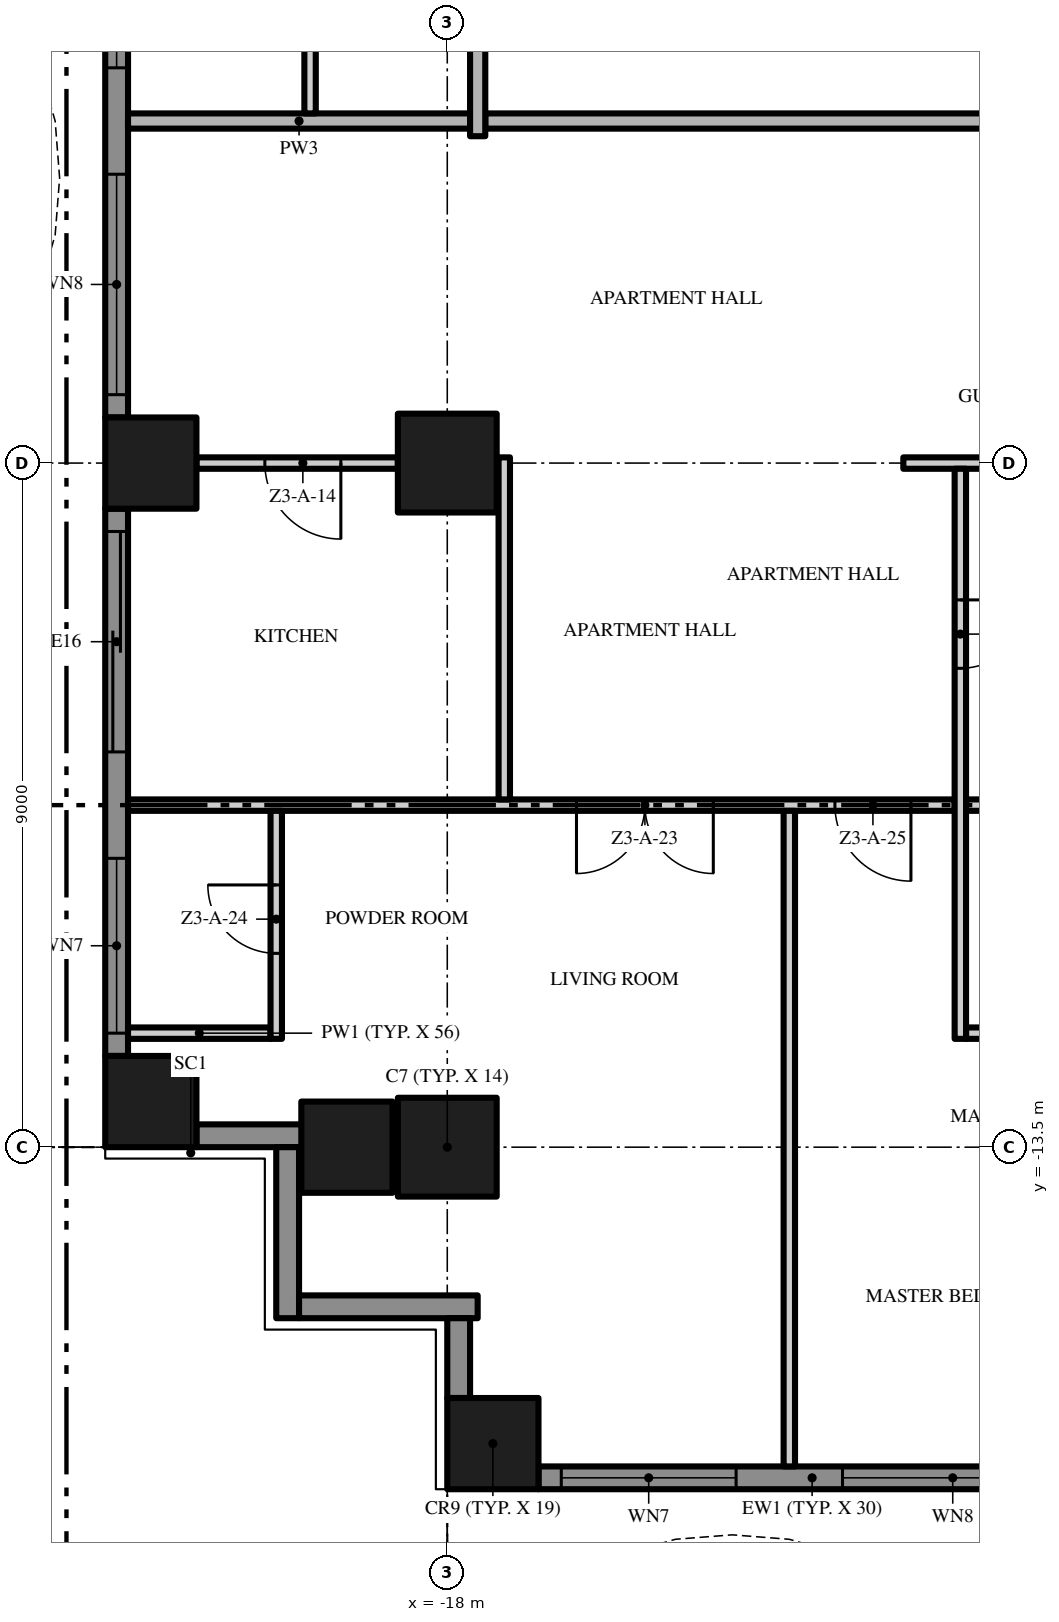
"""IFC4 building model, lengths in metres.
Left out: names, types, materials, properties, quantities, classifications, styles, units other than length and angle.
Written with IfcOpenShell. Run it as: python <this file> out.ifc"""

import sys

from ifc_helpers import new_model, si_unit, direction, frame, frame_2d, origin, origin_2d, place, context, subcontext, project, spatial, polyline, rectangle, outline, extrude, element, fill, save


model = new_model("IFC4")
c1 = context("Model", 3, precision=1e-05, world=origin(), true_north=direction((0.0, 1.0)))
c2 = subcontext(c1, "Body", "Model", "MODEL_VIEW")
j1 = project(units=[si_unit("LENGTHUNIT", "METRE"), si_unit("PLANEANGLEUNIT", "RADIAN")], contexts=[c1])
p1 = place(None, origin())
s1 = spatial("IfcSite", under=j1, at=p1, CompositionType="ELEMENT")
p2 = place(p1, origin())
s2 = spatial("IfcBuilding", under=s1, at=p2, CompositionType="ELEMENT")
p3 = place(p2, frame((0.0, 0.0, 128.8)))
s3 = spatial("IfcBuildingStorey", under=s2, at=p3, CompositionType="ELEMENT", Elevation=128.8)
p4 = place(p3, frame((-18.0, -13.5, 0.0), z_axis=(0.0, 0.0, 1.0), x_axis=(1.0, 0.0, 0.0)))
e1 = element("IfcColumn", 1, at=p4, inside=s3, PredefinedType="COLUMN", context=c2, shape_type="SweptSolid", body=[
    extrude(rectangle(XDim=1.3, YDim=1.3, at=origin_2d()), origin(), (0.0, 0.0, 1.0), 3.5),
])
p5 = place(p3, frame((-17.4, -17.4, 0.0), z_axis=(0.0, 0.0, 1.0), x_axis=(1.0, 0.0, 0.0)))
e2 = element("IfcColumn", 2, at=p5, inside=s3, PredefinedType="COLUMN", context=c2, shape_type="SweptSolid", body=[
    extrude(rectangle(XDim=1.2, YDim=1.2, at=origin_2d()), origin(), (0.0, 0.0, 1.0), 3.5),
])
p6 = place(p3, frame((-18.0, -4.5, 0.0), z_axis=(0.0, 0.0, 1.0), x_axis=(1.0, 0.0, 0.0)))
e3 = element("IfcColumn", 3, at=p6, inside=s3, PredefinedType="COLUMN", context=c2, shape_type="SweptSolid", body=[
    extrude(rectangle(XDim=1.3, YDim=1.3, at=origin_2d()), origin(), (0.0, 0.0, 1.0), 3.5),
])
for number, where, z_axis, x_axis in (
    (4, (-21.9, -12.9, 0.0), (0.0, 0.0, 1.0), (1.0, 0.0, 0.0)),
    (5, (-19.32, -13.5, 0.0), (0.0, 0.0, 1.0), (1.0, 0.0, 0.0)),
    (6, (-21.9, -4.5, 0.0), (0.0, 0.0, 1.0), (1.0, 0.0, 0.0)),
):
    element("IfcColumn", number, at=place(p3, frame(where, z_axis=z_axis, x_axis=x_axis)), inside=s3, PredefinedType="COLUMN", context=c2, shape_type="SweptSolid", body=[
        extrude(rectangle(XDim=1.2, YDim=1.2, at=origin_2d()), origin(), (0.0, 0.0, 1.0), 3.5),
    ])
p7 = place(p3, frame((-9.6, -17.85, 0.0), z_axis=(0.0, 0.0, 1.0), x_axis=(-1.0, 0.0, 0.0)))
e7 = element("IfcWall", 7, at=p7, inside=s3, PredefinedType="SOLIDWALL", context=c2, shape_type="SweptSolid", body=[
    extrude(rectangle(XDim=7.2, YDim=0.3, at=frame_2d((3.6, 0.0))), origin(), (0.0, 0.0, 1.0), 3.5),
])
p8 = place(p7, frame((4.6, 0.0, 0.45)))
e8 = element("IfcOpeningElement", 8, at=p8, cuts=e7, PredefinedType="OPENING", context=c2, shape_type="SweptSolid", body=[
    extrude(rectangle(XDim=2.3, YDim=2.65, at=frame_2d((1.15, 1.325))), frame((0.0, 0.16, 0.0), z_axis=(0.0, -1.0, 0.0), x_axis=(1.0, 0.0, 0.0)), (0.0, 0.0, 1.0), 0.32),
])
p9 = place(p7, frame((0.3, 0.0, 0.45)))
e9 = element("IfcOpeningElement", 9, at=p9, cuts=e7, PredefinedType="OPENING", context=c2, shape_type="SweptSolid", body=[
    extrude(rectangle(XDim=2.9, YDim=2.65, at=frame_2d((1.45, 1.325))), frame((0.0, 0.16, 0.0), z_axis=(0.0, -1.0, 0.0), x_axis=(1.0, 0.0, 0.0)), (0.0, 0.0, 1.0), 0.32),
])
p10 = place(p3, frame((-22.35, -3.9, 0.0), z_axis=(0.0, 0.0, 1.0), x_axis=(0.0, 1.0, 0.0)))
e10 = element("IfcWall", 10, at=p10, inside=s3, PredefinedType="SOLIDWALL", context=c2, shape_type="SweptSolid", body=[
    extrude(rectangle(XDim=7.8, YDim=0.3, at=frame_2d((3.9, 0.0))), origin(), (0.0, 0.0, 1.0), 3.5),
])
p11 = place(p10, frame((4.6, 0.0, 0.45)))
e11 = element("IfcOpeningElement", 11, at=p11, cuts=e10, PredefinedType="OPENING", context=c2, shape_type="SweptSolid", body=[
    extrude(rectangle(XDim=2.9, YDim=2.65, at=frame_2d((1.45, 1.325))), frame((0.0, 0.16, 0.0), z_axis=(0.0, -1.0, 0.0), x_axis=(1.0, 0.0, 0.0)), (0.0, 0.0, 1.0), 0.32),
])
p12 = place(p10, frame((0.3, 0.0, 0.45)))
e12 = element("IfcOpeningElement", 12, at=p12, cuts=e10, PredefinedType="OPENING", context=c2, shape_type="SweptSolid", body=[
    extrude(rectangle(XDim=2.9, YDim=2.65, at=frame_2d((1.45, 1.325))), frame((0.0, 0.16, 0.0), z_axis=(0.0, -1.0, 0.0), x_axis=(1.0, 0.0, 0.0)), (0.0, 0.0, 1.0), 0.32),
])
p13 = place(p3, frame((-22.35, -12.3, 0.0), z_axis=(0.0, 0.0, 1.0), x_axis=(0.0, 1.0, 0.0)))
e13 = element("IfcWall", 13, at=p13, inside=s3, PredefinedType="SOLIDWALL", context=c2, shape_type="SweptSolid", body=[
    extrude(rectangle(XDim=7.2, YDim=0.3, at=frame_2d((3.6, 0.0))), origin(), (0.0, 0.0, 1.0), 3.5),
])
p14 = place(p13, frame((4.0, 0.0, 0.0)))
e14 = element("IfcOpeningElement", 14, at=p14, cuts=e13, PredefinedType="OPENING", context=c2, shape_type="SweptSolid", body=[
    extrude(rectangle(XDim=2.9, YDim=2.4, at=frame_2d((1.45, 1.2))), frame((0.0, 0.16, 0.0), z_axis=(0.0, -1.0, 0.0), x_axis=(1.0, 0.0, 0.0)), (0.0, 0.0, 1.0), 0.32),
])
p15 = place(p13, frame((0.3, 0.0, 0.45)))
e15 = element("IfcOpeningElement", 15, at=p15, cuts=e13, PredefinedType="OPENING", context=c2, shape_type="SweptSolid", body=[
    extrude(rectangle(XDim=2.3, YDim=2.65, at=frame_2d((1.15, 1.325))), frame((0.0, 0.16, 0.0), z_axis=(0.0, -1.0, 0.0), x_axis=(1.0, 0.0, 0.0)), (0.0, 0.0, 1.0), 0.32),
])
p16 = place(p3, frame((-19.85, -13.35, 0.0), z_axis=(0.0, 0.0, 1.0), x_axis=(-1.0, 0.0, 0.0)))
e16 = element("IfcWall", 16, at=p16, inside=s3, PredefinedType="SOLIDWALL", context=c2, shape_type="SweptSolid", body=[
    extrude(rectangle(XDim=1.45, YDim=0.3, at=frame_2d((0.725, 0.0))), origin(), (0.0, 0.0, 1.0), 3.5),
])
p17 = place(p3, frame((-20.1, -15.75, 0.0), z_axis=(0.0, 0.0, 1.0), x_axis=(0.0, 1.0, 0.0)))
e17 = element("IfcWall", 17, at=p17, inside=s3, PredefinedType="SOLIDWALL", context=c2, shape_type="SweptSolid", body=[
    extrude(rectangle(XDim=2.25, YDim=0.3, at=frame_2d((1.125, 0.0))), origin(), (0.0, 0.0, 1.0), 3.5),
])
p18 = place(p3, frame((-17.6, -15.6, 0.0), z_axis=(0.0, 0.0, 1.0), x_axis=(-1.0, 0.0, 0.0)))
e18 = element("IfcWall", 18, at=p18, inside=s3, PredefinedType="SOLIDWALL", context=c2, shape_type="SweptSolid", body=[
    extrude(rectangle(XDim=2.35, YDim=0.3, at=frame_2d((1.175, 0.0))), origin(), (0.0, 0.0, 1.0), 3.5),
])
p19 = place(p3, frame((-17.85, -16.8, 0.0), z_axis=(0.0, 0.0, 1.0), x_axis=(0.0, 1.0, 0.0)))
e19 = element("IfcWall", 19, at=p19, inside=s3, PredefinedType="SOLIDWALL", context=c2, shape_type="SweptSolid", body=[
    extrude(rectangle(XDim=1.05, YDim=0.3, at=frame_2d((0.525, 0.0))), origin(), (0.0, 0.0, 1.0), 3.5),
])
p20 = place(p3, origin())
e20 = element("IfcWall", 20, at=p20, inside=s3, PredefinedType="USERDEFINED", context=c2, shape_type="SweptSolid", body=[
    extrude(outline(polyline([(-18.0, -19.8), (-16.5, -19.095), (-15.0, -18.659), (-14.25, -18.6), (-13.5, -18.659), (-12.0, -19.095), (-10.5, -19.8), (-9.0, -20.505), (-7.5, -20.941), (-6.75, -21.0), (-6.0, -20.941), (-4.5, -20.505), (-3.0, -19.8), (-1.5, -19.095), (0.0, -18.659), (0.75, -18.6), (1.5, -18.659), (3.0, -19.095), (4.5, -19.8), (6.0, -20.505), (7.5, -20.941), (8.25, -21.0), (9.0, -20.941), (10.5, -20.505), (12.0, -19.8), (13.5, -19.095), (15.0, -18.659), (15.75, -18.6), (16.5, -18.659), (18.0, -19.095), (18.07, -18.855), (16.545, -18.411), (15.75, -18.349), (14.955, -18.411), (13.411, -18.86), (11.894, -19.574), (10.411, -20.271), (8.955, -20.694), (8.25, -20.749), (7.545, -20.694), (6.089, -20.271), (4.606, -19.574), (3.089, -18.86), (1.545, -18.411), (0.75, -18.349), (-0.045, -18.411), (-1.589, -18.86), (-3.106, -19.574), (-4.589, -20.271), (-6.045, -20.694), (-6.75, -20.749), (-7.455, -20.694), (-8.911, -20.271), (-10.394, -19.574), (-11.911, -18.86), (-13.455, -18.411), (-14.25, -18.349), (-15.045, -18.411), (-16.589, -18.86), (-18.106, -19.574), (-18.0, -19.8)])), origin(), (0.0, 0.0, 1.0), 0.9),
])
p21 = place(p3, origin())
e21 = element("IfcWall", 21, at=p21, inside=s3, PredefinedType="USERDEFINED", context=c2, shape_type="SweptSolid", body=[
    extrude(outline(polyline([(-24.3, 18.0), (-23.595, 16.5), (-23.159, 15.0), (-23.1, 14.25), (-23.159, 13.5), (-23.595, 12.0), (-24.3, 10.5), (-25.005, 9.0), (-25.441, 7.5), (-25.5, 6.75), (-25.441, 6.0), (-25.005, 4.5), (-24.3, 3.0), (-23.595, 1.5), (-23.159, 0.0), (-23.1, -0.75), (-23.159, -1.5), (-23.595, -3.0), (-24.3, -4.5), (-25.005, -6.0), (-25.441, -7.5), (-25.5, -8.25), (-25.441, -9.0), (-25.005, -10.5), (-24.3, -12.0), (-23.595, -13.5), (-23.368, -13.394), (-24.074, -11.894), (-24.771, -10.411), (-25.194, -8.955), (-25.249, -8.25), (-25.194, -7.545), (-24.771, -6.089), (-24.074, -4.606), (-23.36, -3.089), (-22.911, -1.545), (-22.849, -0.75), (-22.911, 0.045), (-23.36, 1.589), (-24.074, 3.106), (-24.771, 4.589), (-25.194, 6.045), (-25.249, 6.75), (-25.194, 7.455), (-24.771, 8.911), (-24.074, 10.394), (-23.36, 11.911), (-22.911, 13.455), (-22.849, 14.25), (-22.911, 15.045), (-23.36, 16.589), (-24.074, 18.106), (-24.3, 18.0)])), origin(), (0.0, 0.0, 1.0), 0.9),
])
p22 = place(p3, frame((-22.2, -12.0, 0.0), z_axis=(0.0, 0.0, 1.0), x_axis=(1.0, 0.0, 0.0)))
e22 = element("IfcWall", 22, at=p22, inside=s3, PredefinedType="PARTITIONING", context=c2, shape_type="SweptSolid", body=[
    extrude(rectangle(XDim=1.875, YDim=0.15, at=frame_2d((0.938, 0.0))), origin(), (0.0, 0.0, 1.0), 3.5),
])
p23 = place(p3, frame((-11.175, -12.0, 0.0), z_axis=(0.0, 0.0, 1.0), x_axis=(1.0, 0.0, 0.0)))
e23 = element("IfcWall", 23, at=p23, inside=s3, PredefinedType="PARTITIONING", context=c2, shape_type="SweptSolid", body=[
    extrude(rectangle(XDim=2.1, YDim=0.15, at=frame_2d((1.05, 0.0))), origin(), (0.0, 0.0, 1.0), 3.5),
])
p24 = place(p23, frame((0.6, 0.0, 0.0)))
e24 = element("IfcOpeningElement", 24, at=p24, cuts=e23, PredefinedType="OPENING", context=c2, shape_type="SweptSolid", body=[
    extrude(rectangle(XDim=0.9, YDim=2.1, at=frame_2d((0.45, 1.05))), frame((0.0, 0.085, 0.0), z_axis=(0.0, -1.0, 0.0), x_axis=(1.0, 0.0, 0.0)), (0.0, 0.0, 1.0), 0.17),
])
p25 = place(p3, frame((-11.325, -9.0, 0.0), z_axis=(0.0, 0.0, 1.0), x_axis=(-1.0, 0.0, 0.0)))
e25 = element("IfcWall", 25, at=p25, inside=s3, PredefinedType="PARTITIONING", context=c2, shape_type="SweptSolid", body=[
    extrude(rectangle(XDim=10.875, YDim=0.15, at=frame_2d((5.438, 0.0))), origin(), (0.0, 0.0, 1.0), 3.5),
])
p26 = place(p25, frame((3.175, 0.0, 0.0)))
e26 = element("IfcOpeningElement", 26, at=p26, cuts=e25, PredefinedType="OPENING", context=c2, shape_type="SweptSolid", body=[
    extrude(rectangle(XDim=1.8, YDim=2.4, at=frame_2d((0.9, 1.2))), frame((0.0, 0.085, 0.0), z_axis=(0.0, -1.0, 0.0), x_axis=(1.0, 0.0, 0.0)), (0.0, 0.0, 1.0), 0.17),
])
p27 = place(p25, frame((0.575, 0.0, 0.0)))
e27 = element("IfcOpeningElement", 27, at=p27, cuts=e25, PredefinedType="OPENING", context=c2, shape_type="SweptSolid", body=[
    extrude(rectangle(XDim=1.0, YDim=2.4, at=frame_2d((0.5, 1.2))), frame((0.0, 0.085, 0.0), z_axis=(0.0, -1.0, 0.0), x_axis=(1.0, 0.0, 0.0)), (0.0, 0.0, 1.0), 0.17),
])
p28 = place(p3, frame((-11.175, -9.0, 0.0), z_axis=(0.0, 0.0, 1.0), x_axis=(1.0, 0.0, 0.0)))
e28 = element("IfcWall", 28, at=p28, inside=s3, PredefinedType="PARTITIONING", context=c2, shape_type="SweptSolid", body=[
    extrude(rectangle(XDim=2.1, YDim=0.15, at=frame_2d((1.05, 0.0))), origin(), (0.0, 0.0, 1.0), 3.5),
])
p29 = place(p3, frame((-18.65, -4.5, 0.0), z_axis=(0.0, 0.0, 1.0), x_axis=(-1.0, 0.0, 0.0)))
e29 = element("IfcWall", 29, at=p29, inside=s3, PredefinedType="PARTITIONING", context=c2, shape_type="SweptSolid", body=[
    extrude(rectangle(XDim=2.65, YDim=0.15, at=frame_2d((1.325, 0.0))), origin(), (0.0, 0.0, 1.0), 3.5),
])
p30 = place(p29, frame((0.75, 0.0, 0.0)))
e30 = element("IfcOpeningElement", 30, at=p30, cuts=e29, PredefinedType="OPENING", context=c2, shape_type="SweptSolid", body=[
    extrude(rectangle(XDim=1.0, YDim=2.4, at=frame_2d((0.5, 1.2))), frame((0.0, 0.085, 0.0), z_axis=(0.0, -1.0, 0.0), x_axis=(1.0, 0.0, 0.0)), (0.0, 0.0, 1.0), 0.17),
])
p31 = place(p3, frame((-12.0, -4.5, 0.0), z_axis=(0.0, 0.0, 1.0), x_axis=(1.0, 0.0, 0.0)))
e31 = element("IfcWall", 31, at=p31, inside=s3, PredefinedType="PARTITIONING", context=c2, shape_type="SweptSolid", body=[
    extrude(rectangle(XDim=2.35, YDim=0.15, at=frame_2d((1.175, 0.0))), origin(), (0.0, 0.0, 1.0), 3.5),
])
p32 = place(p3, frame((17.5, 0.0, 0.0), z_axis=(0.0, 0.0, 1.0), x_axis=(-1.0, 0.0, 0.0)))
e32 = element("IfcWall", 32, at=p32, inside=s3, PredefinedType="PARTITIONING", context=c2, shape_type="SweptSolid", body=[
    extrude(rectangle(XDim=35.0, YDim=0.2, at=frame_2d((17.5, 0.0))), origin(), (0.0, 0.0, 1.0), 3.5),
])
p33 = place(p32, frame((16.75, 0.0, 0.0)))
e33 = element("IfcOpeningElement", 33, at=p33, cuts=e32, PredefinedType="OPENING", context=c2, shape_type="SweptSolid", body=[
    extrude(rectangle(XDim=1.5, YDim=2.4, at=frame_2d((0.75, 1.2))), frame((0.0, 0.11, 0.0), z_axis=(0.0, -1.0, 0.0), x_axis=(1.0, 0.0, 0.0)), (0.0, 0.0, 1.0), 0.22),
])
p34 = place(p3, frame((-22.2, 0.0, 0.0), z_axis=(0.0, 0.0, 1.0), x_axis=(1.0, 0.0, 0.0)))
e34 = element("IfcWall", 34, at=p34, inside=s3, PredefinedType="PARTITIONING", context=c2, shape_type="SweptSolid", body=[
    extrude(rectangle(XDim=4.5, YDim=0.2, at=frame_2d((2.25, 0.0))), origin(), (0.0, 0.0, 1.0), 3.5),
])
p35 = place(p3, frame((-20.25, -12.075, 0.0), z_axis=(0.0, 0.0, 1.0), x_axis=(0.0, 1.0, 0.0)))
e35 = element("IfcWall", 35, at=p35, inside=s3, PredefinedType="PARTITIONING", context=c2, shape_type="SweptSolid", body=[
    extrude(rectangle(XDim=3.0, YDim=0.15, at=frame_2d((1.5, 0.0))), origin(), (0.0, 0.0, 1.0), 3.5),
])
p36 = place(p35, frame((1.125, 0.0, 0.0)))
e36 = element("IfcOpeningElement", 36, at=p36, cuts=e35, PredefinedType="OPENING", context=c2, shape_type="SweptSolid", body=[
    extrude(rectangle(XDim=0.9, YDim=2.1, at=frame_2d((0.45, 1.05))), frame((0.0, 0.085, 0.0), z_axis=(0.0, -1.0, 0.0), x_axis=(1.0, 0.0, 0.0)), (0.0, 0.0, 1.0), 0.17),
])
p37 = place(p3, frame((-19.805, 0.1, 0.0), z_axis=(0.0, 0.0, 1.0), x_axis=(0.0, 1.0, 0.0)))
e37 = element("IfcWall", 37, at=p37, inside=s3, PredefinedType="PARTITIONING", context=c2, shape_type="SweptSolid", body=[
    extrude(rectangle(XDim=2.225, YDim=0.15, at=frame_2d((1.113, 0.0))), origin(), (0.0, 0.0, 1.0), 3.5),
])
p38 = place(p3, frame((-17.6, -0.2, 0.0), z_axis=(0.0, 0.0, 1.0), x_axis=(0.0, 1.0, 0.0)))
e38 = element("IfcWall", 38, at=p38, inside=s3, PredefinedType="PARTITIONING", context=c2, shape_type="SweptSolid", body=[
    extrude(rectangle(XDim=4.05, YDim=0.2, at=frame_2d((2.025, 0.0))), origin(), (0.0, 0.0, 1.0), 3.5),
])
p39 = place(p3, frame((-17.25, -8.925, 0.0), z_axis=(0.0, 0.0, 1.0), x_axis=(0.0, 1.0, 0.0)))
e39 = element("IfcWall", 39, at=p39, inside=s3, PredefinedType="PARTITIONING", context=c2, shape_type="SweptSolid", body=[
    extrude(rectangle(XDim=4.5, YDim=0.15, at=frame_2d((2.25, 0.0))), origin(), (0.0, 0.0, 1.0), 3.5),
])
p40 = place(p3, frame((-13.5, -17.7, 0.0), z_axis=(0.0, 0.0, 1.0), x_axis=(0.0, 1.0, 0.0)))
e40 = element("IfcWall", 40, at=p40, inside=s3, PredefinedType="PARTITIONING", context=c2, shape_type="SweptSolid", body=[
    extrude(rectangle(XDim=8.625, YDim=0.15, at=frame_2d((4.312, 0.0))), origin(), (0.0, 0.0, 1.0), 3.5),
])
p41 = place(p3, frame((-11.25, -4.575, 0.0), z_axis=(0.0, 0.0, 1.0), x_axis=(0.0, -1.0, 0.0)))
e41 = element("IfcWall", 41, at=p41, inside=s3, PredefinedType="PARTITIONING", context=c2, shape_type="SweptSolid", body=[
    extrude(rectangle(XDim=7.5, YDim=0.15, at=frame_2d((3.75, 0.0))), origin(), (0.0, 0.0, 1.0), 3.5),
])
p42 = place(p41, frame((1.725, 0.0, 0.0)))
e42 = element("IfcOpeningElement", 42, at=p42, cuts=e41, PredefinedType="OPENING", context=c2, shape_type="SweptSolid", body=[
    extrude(rectangle(XDim=0.9, YDim=2.1, at=frame_2d((0.45, 1.05))), frame((0.0, 0.085, 0.0), z_axis=(0.0, -1.0, 0.0), x_axis=(1.0, 0.0, 0.0)), (0.0, 0.0, 1.0), 0.17),
])
p43 = place(p8, origin())
e43 = element("IfcWindow", 43, at=p43, inside=s3, PartitioningType="SINGLE_PANEL", PredefinedType="WINDOW", context=c2, shape_type="SweptSolid", body=[
    extrude(rectangle(XDim=2.3, YDim=2.65, at=frame_2d((1.15, 1.325))), frame((0.0, 0.03, 0.0), z_axis=(0.0, -1.0, 0.0), x_axis=(1.0, 0.0, 0.0)), (0.0, 0.0, 1.0), 0.06),
])
fill(e8, e43)
p44 = place(p9, origin())
e44 = element("IfcWindow", 44, at=p44, inside=s3, PartitioningType="SINGLE_PANEL", PredefinedType="WINDOW", context=c2, shape_type="SweptSolid", body=[
    extrude(rectangle(XDim=2.9, YDim=2.65, at=frame_2d((1.45, 1.325))), frame((0.0, 0.03, 0.0), z_axis=(0.0, -1.0, 0.0), x_axis=(1.0, 0.0, 0.0)), (0.0, 0.0, 1.0), 0.06),
])
fill(e9, e44)
p45 = place(p11, origin())
e45 = element("IfcWindow", 45, at=p45, inside=s3, PartitioningType="SINGLE_PANEL", PredefinedType="WINDOW", context=c2, shape_type="SweptSolid", body=[
    extrude(rectangle(XDim=2.9, YDim=2.65, at=frame_2d((1.45, 1.325))), frame((0.0, 0.03, 0.0), z_axis=(0.0, -1.0, 0.0), x_axis=(1.0, 0.0, 0.0)), (0.0, 0.0, 1.0), 0.06),
])
fill(e11, e45)
p46 = place(p12, origin())
e46 = element("IfcWindow", 46, at=p46, inside=s3, PartitioningType="SINGLE_PANEL", PredefinedType="WINDOW", context=c2, shape_type="SweptSolid", body=[
    extrude(rectangle(XDim=2.9, YDim=2.65, at=frame_2d((1.45, 1.325))), frame((0.0, 0.03, 0.0), z_axis=(0.0, -1.0, 0.0), x_axis=(1.0, 0.0, 0.0)), (0.0, 0.0, 1.0), 0.06),
])
fill(e12, e46)
p47 = place(p14, origin())
e47 = element("IfcDoor", 47, at=p47, inside=s3, OperationType="SINGLE_SWING_LEFT", PredefinedType="DOOR", context=c2, shape_type="SweptSolid", body=[
    extrude(rectangle(XDim=2.9, YDim=2.4, at=frame_2d((1.45, 1.2))), frame((0.0, 0.025, 0.0), z_axis=(0.0, -1.0, 0.0), x_axis=(1.0, 0.0, 0.0)), (0.0, 0.0, 1.0), 0.05),
])
fill(e14, e47)
p48 = place(p15, origin())
e48 = element("IfcWindow", 48, at=p48, inside=s3, PartitioningType="SINGLE_PANEL", PredefinedType="WINDOW", context=c2, shape_type="SweptSolid", body=[
    extrude(rectangle(XDim=2.3, YDim=2.65, at=frame_2d((1.15, 1.325))), frame((0.0, 0.03, 0.0), z_axis=(0.0, -1.0, 0.0), x_axis=(1.0, 0.0, 0.0)), (0.0, 0.0, 1.0), 0.06),
])
fill(e15, e48)
p49 = place(p30, origin())
e49 = element("IfcDoor", 49, at=p49, inside=s3, OperationType="SINGLE_SWING_LEFT", PredefinedType="DOOR", context=c2, shape_type="SweptSolid", body=[
    extrude(rectangle(XDim=1.0, YDim=2.4, at=frame_2d((0.5, 1.2))), frame((0.0, 0.025, 0.0), z_axis=(0.0, -1.0, 0.0), x_axis=(1.0, 0.0, 0.0)), (0.0, 0.0, 1.0), 0.05),
])
fill(e30, e49)
p50 = place(p42, origin())
e50 = element("IfcDoor", 50, at=p50, inside=s3, OperationType="SINGLE_SWING_LEFT", PredefinedType="DOOR", context=c2, shape_type="SweptSolid", body=[
    extrude(rectangle(XDim=0.9, YDim=2.1, at=frame_2d((0.45, 1.05))), frame((0.0, 0.025, 0.0), z_axis=(0.0, -1.0, 0.0), x_axis=(1.0, 0.0, 0.0)), (0.0, 0.0, 1.0), 0.05),
])
fill(e42, e50)
p51 = place(p26, origin())
e51 = element("IfcDoor", 51, at=p51, inside=s3, OperationType="DOUBLE_DOOR_SINGLE_SWING", PredefinedType="DOOR", context=c2, shape_type="SweptSolid", body=[
    extrude(rectangle(XDim=1.8, YDim=2.4, at=frame_2d((0.9, 1.2))), frame((0.0, 0.025, 0.0), z_axis=(0.0, -1.0, 0.0), x_axis=(1.0, 0.0, 0.0)), (0.0, 0.0, 1.0), 0.05),
])
fill(e26, e51)
p52 = place(p36, origin())
e52 = element("IfcDoor", 52, at=p52, inside=s3, OperationType="SINGLE_SWING_RIGHT", PredefinedType="DOOR", context=c2, shape_type="SweptSolid", body=[
    extrude(rectangle(XDim=0.9, YDim=2.1, at=frame_2d((0.45, 1.05))), frame((0.0, 0.025, 0.0), z_axis=(0.0, -1.0, 0.0), x_axis=(1.0, 0.0, 0.0)), (0.0, 0.0, 1.0), 0.05),
])
fill(e36, e52)
p53 = place(p27, origin())
e53 = element("IfcDoor", 53, at=p53, inside=s3, OperationType="SINGLE_SWING_LEFT", PredefinedType="DOOR", context=c2, shape_type="SweptSolid", body=[
    extrude(rectangle(XDim=1.0, YDim=2.4, at=frame_2d((0.5, 1.2))), frame((0.0, 0.025, 0.0), z_axis=(0.0, -1.0, 0.0), x_axis=(1.0, 0.0, 0.0)), (0.0, 0.0, 1.0), 0.05),
])
fill(e27, e53)
save(model, sys.argv[1])
